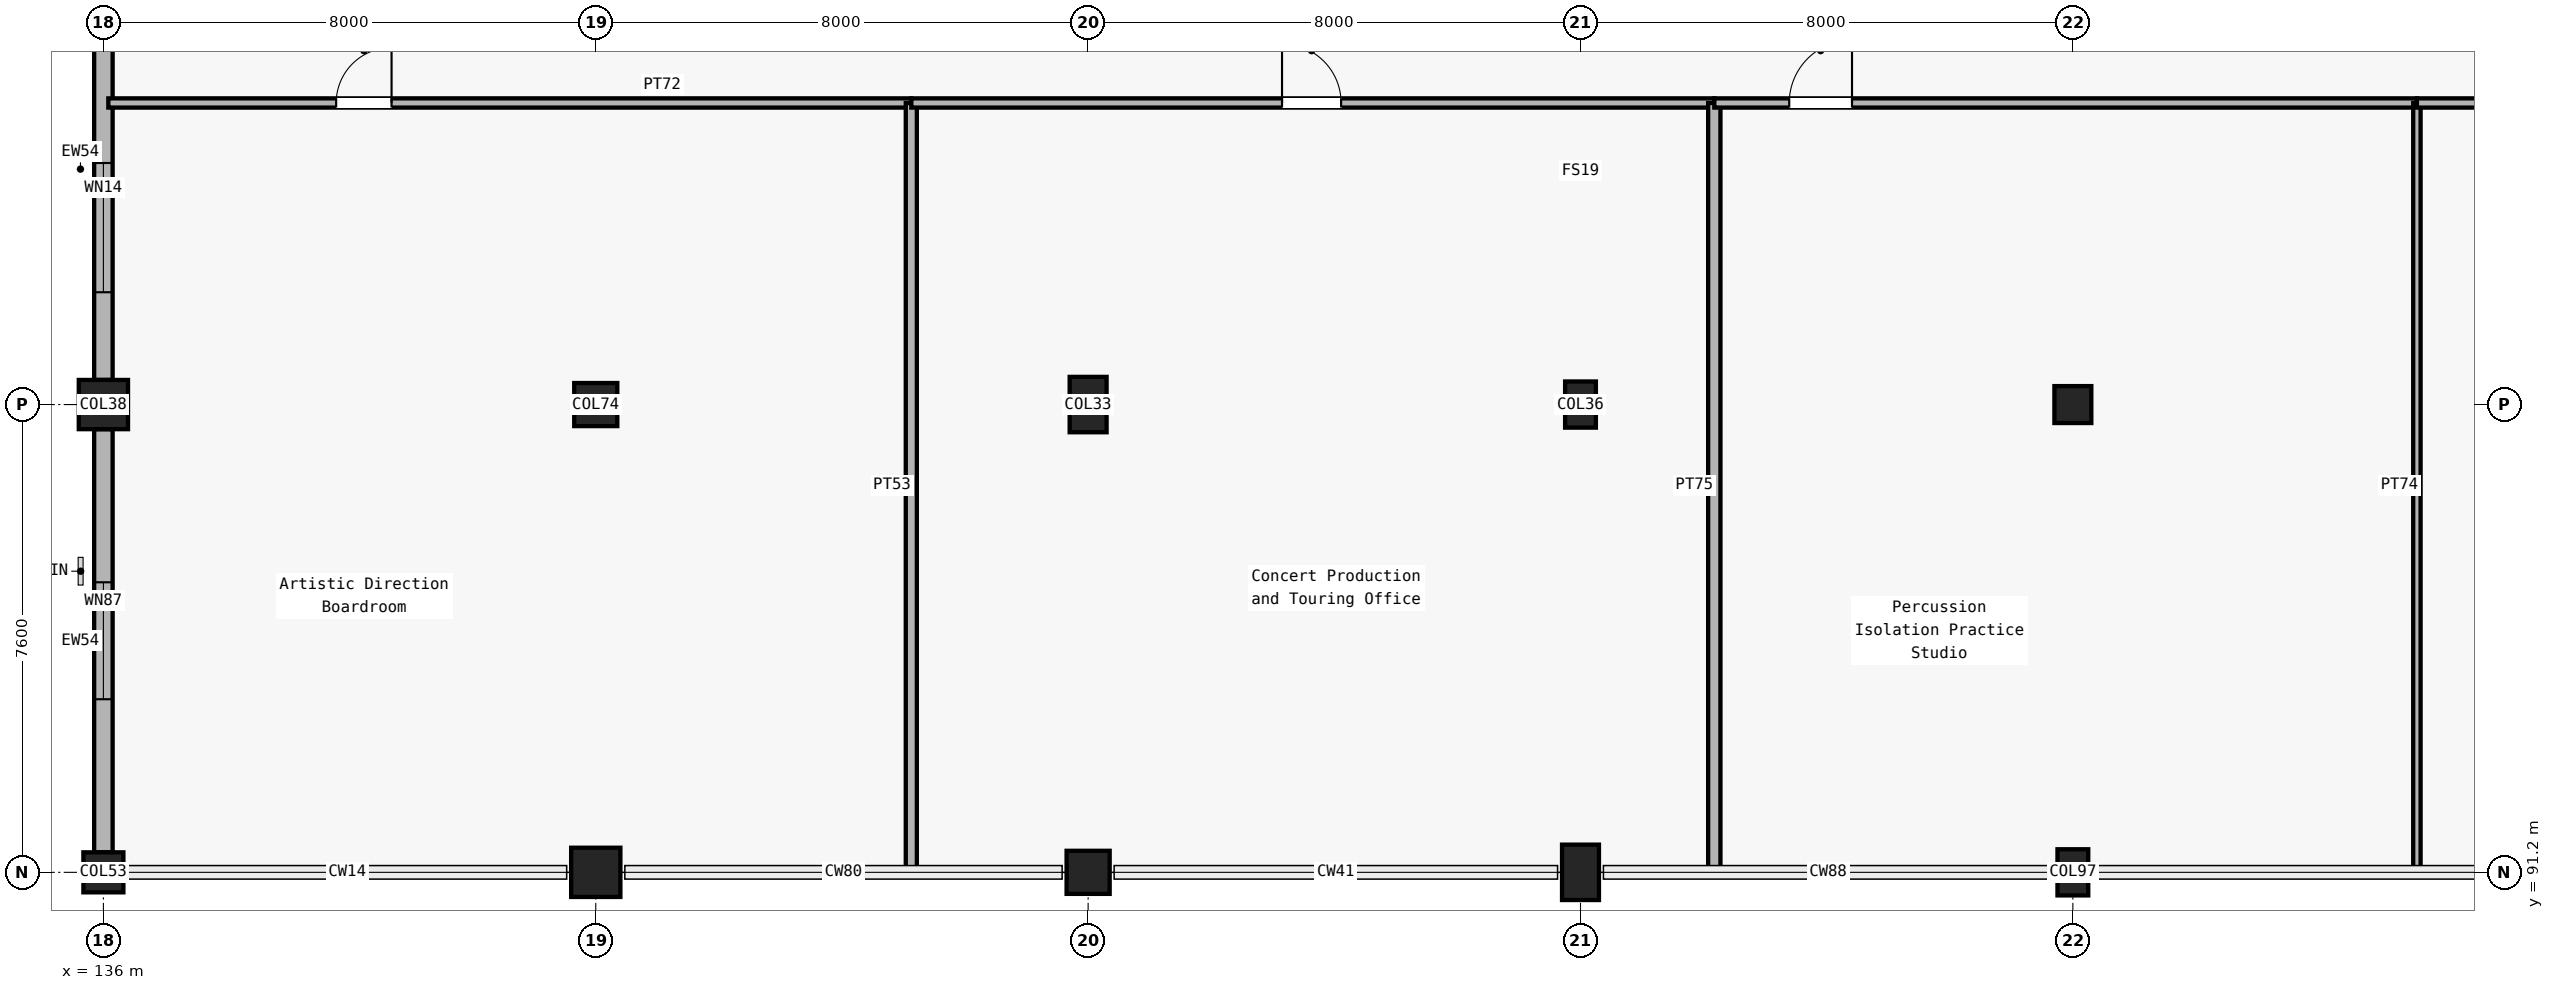
"""IFC4 building model, lengths in metres.
Left out: names, types, materials, properties, quantities, classifications, styles, units other than length and angle.
Written with IfcOpenShell. Run it as: python <this file> out.ifc"""

import sys

from ifc_helpers import new_model, si_unit, direction, frame, frame_2d, origin, origin_2d, place, context, subcontext, project, spatial, rectangle, circle, extrude, element, fill, save


model = new_model("IFC4")
c1 = context("Model", 3, precision=1e-05, world=origin(), true_north=direction((0.0, 1.0)))
c2 = subcontext(c1, "Body", "Model", "MODEL_VIEW")
j1 = project(units=[si_unit("LENGTHUNIT", "METRE"), si_unit("PLANEANGLEUNIT", "RADIAN")], contexts=[c1])
p1 = place(None, origin())
s1 = spatial("IfcSite", under=j1, at=p1, CompositionType="ELEMENT")
p2 = place(p1, origin())
s2 = spatial("IfcBuilding", under=s1, at=p2, CompositionType="ELEMENT")
p3 = place(p2, frame((0.0, 0.0, 19.8)))
s3 = spatial("IfcBuildingStorey", under=s2, at=p3, CompositionType="ELEMENT", Elevation=19.8)
p4 = place(p3, frame((136.0, 91.2, 0.0), z_axis=(0.0, 0.0, 1.0), x_axis=(1.0, 0.0, 0.0)))
e1 = element("IfcColumn", 1, at=p4, inside=s3, PredefinedType="COLUMN", context=c2, shape_type="SweptSolid", body=[
    extrude(circle(Radius=0.325, at=origin_2d()), origin(), (0.0, 0.0, 1.0), 4.8),
])
for number, where, z_axis, x_axis in (
    (2, (136.0, 98.8, 0.0), (0.0, 0.0, 1.0), (1.0, 0.0, 0.0)),
    (3, (144.0, 91.2, 0.0), (0.0, 0.0, 1.0), (1.0, 0.0, 0.0)),
):
    element("IfcColumn", number, at=place(p3, frame(where, z_axis=z_axis, x_axis=x_axis)), inside=s3, PredefinedType="COLUMN", context=c2, shape_type="SweptSolid", body=[
        extrude(rectangle(XDim=0.8, YDim=0.8, at=origin_2d()), origin(), (0.0, 0.0, 1.0), 4.8),
    ])
for number, where, z_axis, x_axis in (
    (4, (144.0, 98.8, 0.0), (0.0, 0.0, 1.0), (1.0, 0.0, 0.0)),
    (5, (152.0, 91.2, 0.0), (0.0, 0.0, 1.0), (1.0, 0.0, 0.0)),
):
    element("IfcColumn", number, at=place(p3, frame(where, z_axis=z_axis, x_axis=x_axis)), inside=s3, PredefinedType="COLUMN", context=c2, shape_type="SweptSolid", body=[
        extrude(rectangle(XDim=0.7, YDim=0.7, at=origin_2d()), origin(), (0.0, 0.0, 1.0), 4.8),
    ])
for number, where, z_axis, x_axis in (
    (6, (152.0, 98.8, 0.0), (0.0, 0.0, 1.0), (1.0, 0.0, 0.0)),
    (7, (160.0, 91.2, 0.0), (0.0, 0.0, 1.0), (1.0, 0.0, 0.0)),
):
    element("IfcColumn", number, at=place(p3, frame(where, z_axis=z_axis, x_axis=x_axis)), inside=s3, PredefinedType="COLUMN", context=c2, shape_type="SweptSolid", body=[
        extrude(rectangle(XDim=0.6, YDim=0.9, at=origin_2d()), origin(), (0.0, 0.0, 1.0), 4.8),
    ])
for number, where, z_axis, x_axis in (
    (8, (160.0, 98.8, 0.0), (0.0, 0.0, 1.0), (1.0, 0.0, 0.0)),
    (9, (168.0, 91.2, 0.0), (0.0, 0.0, 1.0), (1.0, 0.0, 0.0)),
):
    element("IfcColumn", number, at=place(p3, frame(where, z_axis=z_axis, x_axis=x_axis)), inside=s3, PredefinedType="COLUMN", context=c2, shape_type="SweptSolid", body=[
        extrude(rectangle(XDim=0.5, YDim=0.75, at=origin_2d()), origin(), (0.0, 0.0, 1.0), 4.8),
    ])
p5 = place(p3, frame((168.0, 98.8, 0.0), z_axis=(0.0, 0.0, 1.0), x_axis=(1.0, 0.0, 0.0)))
e10 = element("IfcColumn", 10, at=p5, inside=s3, PredefinedType="COLUMN", context=c2, shape_type="SweptSolid", body=[
    extrude(rectangle(XDim=0.6, YDim=0.6, at=origin_2d()), origin(), (0.0, 0.0, 1.0), 4.8),
])
p6 = place(p3, frame((136.0, 91.525, 0.0), z_axis=(0.0, 0.0, 1.0), x_axis=(0.0, 1.0, 0.0)))
e11 = element("IfcWall", 11, at=p6, inside=s3, PredefinedType="SOLIDWALL", context=c2, shape_type="SweptSolid", body=[
    extrude(rectangle(XDim=6.875, YDim=0.3, at=frame_2d((3.438, 0.0))), origin(), (0.0, 0.0, 1.0), 4.23),
])
p7 = place(p6, frame((2.488, 0.0, 0.95)))
e12 = element("IfcOpeningElement", 12, at=p7, cuts=e11, PredefinedType="OPENING", context=c2, shape_type="SweptSolid", body=[
    extrude(rectangle(XDim=1.9, YDim=1.8, at=frame_2d((0.95, 0.9))), frame((0.0, 0.16, 0.0), z_axis=(0.0, -1.0, 0.0), x_axis=(1.0, 0.0, 0.0)), (0.0, 0.0, 1.0), 0.32),
])
p8 = place(p3, frame((136.0, 99.2, 0.0), z_axis=(0.0, 0.0, 1.0), x_axis=(0.0, 1.0, 0.0)))
e13 = element("IfcWall", 13, at=p8, inside=s3, PredefinedType="SOLIDWALL", context=c2, shape_type="SweptSolid", body=[
    extrude(rectangle(XDim=6.85, YDim=0.3, at=frame_2d((3.425, 0.0))), origin(), (0.0, 0.0, 1.0), 4.23),
])
p9 = place(p8, frame((1.425, 0.0, 0.95)))
e14 = element("IfcOpeningElement", 14, at=p9, cuts=e13, PredefinedType="OPENING", context=c2, shape_type="SweptSolid", body=[
    extrude(rectangle(XDim=2.1, YDim=1.8, at=frame_2d((1.05, 0.9))), frame((0.0, 0.16, 0.0), z_axis=(0.0, -1.0, 0.0), x_axis=(1.0, 0.0, 0.0)), (0.0, 0.0, 1.0), 0.32),
])
p10 = place(p3, frame((136.08, 103.7, 0.0), z_axis=(0.0, 0.0, 1.0), x_axis=(1.0, 0.0, 0.0)))
e15 = element("IfcWall", 15, at=p10, inside=s3, PredefinedType="PARTITIONING", context=c2, shape_type="SweptSolid", body=[
    extrude(rectangle(XDim=13.047, YDim=0.15, at=frame_2d((6.523, 0.0))), origin(), (0.0, 0.0, 1.0), 3.91),
])
p11 = place(p10, frame((3.702, 0.0, 0.0)))
e16 = element("IfcOpeningElement", 16, at=p11, cuts=e15, PredefinedType="OPENING", context=c2, shape_type="SweptSolid", body=[
    extrude(rectangle(XDim=0.9, YDim=2.1, at=frame_2d((0.45, 1.05))), frame((0.0, 0.085, 0.0), z_axis=(0.0, -1.0, 0.0), x_axis=(1.0, 0.0, 0.0)), (0.0, 0.0, 1.0), 0.17),
])
p12 = place(p3, frame((149.127, 91.28, 0.0), z_axis=(0.0, 0.0, 1.0), x_axis=(0.0, 1.0, 0.0)))
e17 = element("IfcWall", 17, at=p12, inside=s3, PredefinedType="PARTITIONING", context=c2, shape_type="SweptSolid", body=[
    extrude(rectangle(XDim=12.42, YDim=0.18, at=frame_2d((6.21, 0.0))), origin(), (0.0, 0.0, 1.0), 3.615),
])
p13 = place(p3, frame((149.127, 103.7, 0.0), z_axis=(0.0, 0.0, 1.0), x_axis=(1.0, 0.0, 0.0)))
e18 = element("IfcWall", 18, at=p13, inside=s3, PredefinedType="PARTITIONING", context=c2, shape_type="SweptSolid", body=[
    extrude(rectangle(XDim=13.047, YDim=0.15, at=frame_2d((6.523, 0.0))), origin(), (0.0, 0.0, 1.0), 3.715),
])
p14 = place(p13, frame((6.023, 0.0, 0.0)))
e19 = element("IfcOpeningElement", 19, at=p14, cuts=e18, PredefinedType="OPENING", context=c2, shape_type="SweptSolid", body=[
    extrude(rectangle(XDim=0.96, YDim=2.1, at=frame_2d((0.48, 1.05))), frame((0.0, 0.085, 0.0), z_axis=(0.0, -1.0, 0.0), x_axis=(1.0, 0.0, 0.0)), (0.0, 0.0, 1.0), 0.17),
])
p15 = place(p3, frame((162.174, 91.28, 0.0), z_axis=(0.0, 0.0, 1.0), x_axis=(0.0, 1.0, 0.0)))
e20 = element("IfcWall", 20, at=p15, inside=s3, PredefinedType="PARTITIONING", context=c2, shape_type="SweptSolid", body=[
    extrude(rectangle(XDim=12.42, YDim=0.2, at=frame_2d((6.21, 0.0))), origin(), (0.0, 0.0, 1.0), 3.895),
])
p16 = place(p3, frame((162.174, 103.7, 0.0), z_axis=(0.0, 0.0, 1.0), x_axis=(1.0, 0.0, 0.0)))
e21 = element("IfcWall", 21, at=p16, inside=s3, PredefinedType="PARTITIONING", context=c2, shape_type="SweptSolid", body=[
    extrude(rectangle(XDim=11.416, YDim=0.15, at=frame_2d((5.708, 0.0))), origin(), (0.0, 0.0, 1.0), 3.865),
])
p17 = place(p16, frame((1.218, 0.0, 0.0)))
e22 = element("IfcOpeningElement", 22, at=p17, cuts=e21, PredefinedType="OPENING", context=c2, shape_type="SweptSolid", body=[
    extrude(rectangle(XDim=1.02, YDim=2.1, at=frame_2d((0.51, 1.05))), frame((0.0, 0.085, 0.0), z_axis=(0.0, -1.0, 0.0), x_axis=(1.0, 0.0, 0.0)), (0.0, 0.0, 1.0), 0.17),
])
p18 = place(p3, frame((173.59, 91.28, 0.0), z_axis=(0.0, 0.0, 1.0), x_axis=(0.0, 1.0, 0.0)))
e23 = element("IfcWall", 23, at=p18, inside=s3, PredefinedType="PARTITIONING", context=c2, shape_type="SweptSolid", body=[
    extrude(rectangle(XDim=12.42, YDim=0.12, at=frame_2d((6.21, 0.0))), origin(), (0.0, 0.0, 1.0), 3.79),
])
p19 = place(p3, frame((173.59, 103.7, 0.0), z_axis=(0.0, 0.0, 1.0), x_axis=(1.0, 0.0, 0.0)))
e24 = element("IfcWall", 24, at=p19, inside=s3, PredefinedType="PARTITIONING", context=c2, shape_type="SweptSolid", body=[
    extrude(rectangle(XDim=10.33, YDim=0.15, at=frame_2d((5.165, 0.0))), origin(), (0.0, 0.0, 1.0), 3.79),
])
p20 = place(p19, frame((5.554, 0.0, 0.0)))
e25 = element("IfcOpeningElement", 25, at=p20, cuts=e24, PredefinedType="OPENING", context=c2, shape_type="SweptSolid", body=[
    extrude(rectangle(XDim=1.08, YDim=2.1, at=frame_2d((0.54, 1.05))), frame((0.0, 0.085, 0.0), z_axis=(0.0, -1.0, 0.0), x_axis=(1.0, 0.0, 0.0)), (0.0, 0.0, 1.0), 0.17),
])
p21 = place(p7, origin())
e26 = element("IfcWindow", 26, at=p21, inside=s3, PartitioningType="DOUBLE_PANEL_VERTICAL", PredefinedType="WINDOW", context=c2, shape_type="SweptSolid", body=[
    extrude(rectangle(XDim=1.9, YDim=1.8, at=frame_2d((0.95, 0.9))), frame((0.0, 0.03, 0.0), z_axis=(0.0, -1.0, 0.0), x_axis=(1.0, 0.0, 0.0)), (0.0, 0.0, 1.0), 0.06),
])
fill(e12, e26)
p22 = place(p9, origin())
e27 = element("IfcWindow", 27, at=p22, inside=s3, PartitioningType="DOUBLE_PANEL_VERTICAL", PredefinedType="WINDOW", context=c2, shape_type="SweptSolid", body=[
    extrude(rectangle(XDim=2.1, YDim=1.8, at=frame_2d((1.05, 0.9))), frame((0.0, 0.03, 0.0), z_axis=(0.0, -1.0, 0.0), x_axis=(1.0, 0.0, 0.0)), (0.0, 0.0, 1.0), 0.06),
])
fill(e14, e27)
p23 = place(p11, origin())
e28 = element("IfcDoor", 28, at=p23, inside=s3, OperationType="SINGLE_SWING_RIGHT", PredefinedType="DOOR", context=c2, shape_type="SweptSolid", body=[
    extrude(rectangle(XDim=0.9, YDim=2.1, at=frame_2d((0.45, 1.05))), frame((0.0, 0.025, 0.0), z_axis=(0.0, -1.0, 0.0), x_axis=(1.0, 0.0, 0.0)), (0.0, 0.0, 1.0), 0.05),
])
fill(e16, e28)
p24 = place(p14, origin())
e29 = element("IfcDoor", 29, at=p24, inside=s3, OperationType="SINGLE_SWING_LEFT", PredefinedType="DOOR", context=c2, shape_type="SweptSolid", body=[
    extrude(rectangle(XDim=0.96, YDim=2.1, at=frame_2d((0.48, 1.05))), frame((0.0, 0.025, 0.0), z_axis=(0.0, -1.0, 0.0), x_axis=(1.0, 0.0, 0.0)), (0.0, 0.0, 1.0), 0.05),
])
fill(e19, e29)
p25 = place(p17, origin())
e30 = element("IfcDoor", 30, at=p25, inside=s3, OperationType="SINGLE_SWING_RIGHT", PredefinedType="DOOR", context=c2, shape_type="SweptSolid", body=[
    extrude(rectangle(XDim=1.02, YDim=2.1, at=frame_2d((0.51, 1.05))), frame((0.0, 0.025, 0.0), z_axis=(0.0, -1.0, 0.0), x_axis=(1.0, 0.0, 0.0)), (0.0, 0.0, 1.0), 0.05),
])
fill(e22, e30)
save(model, sys.argv[1])
